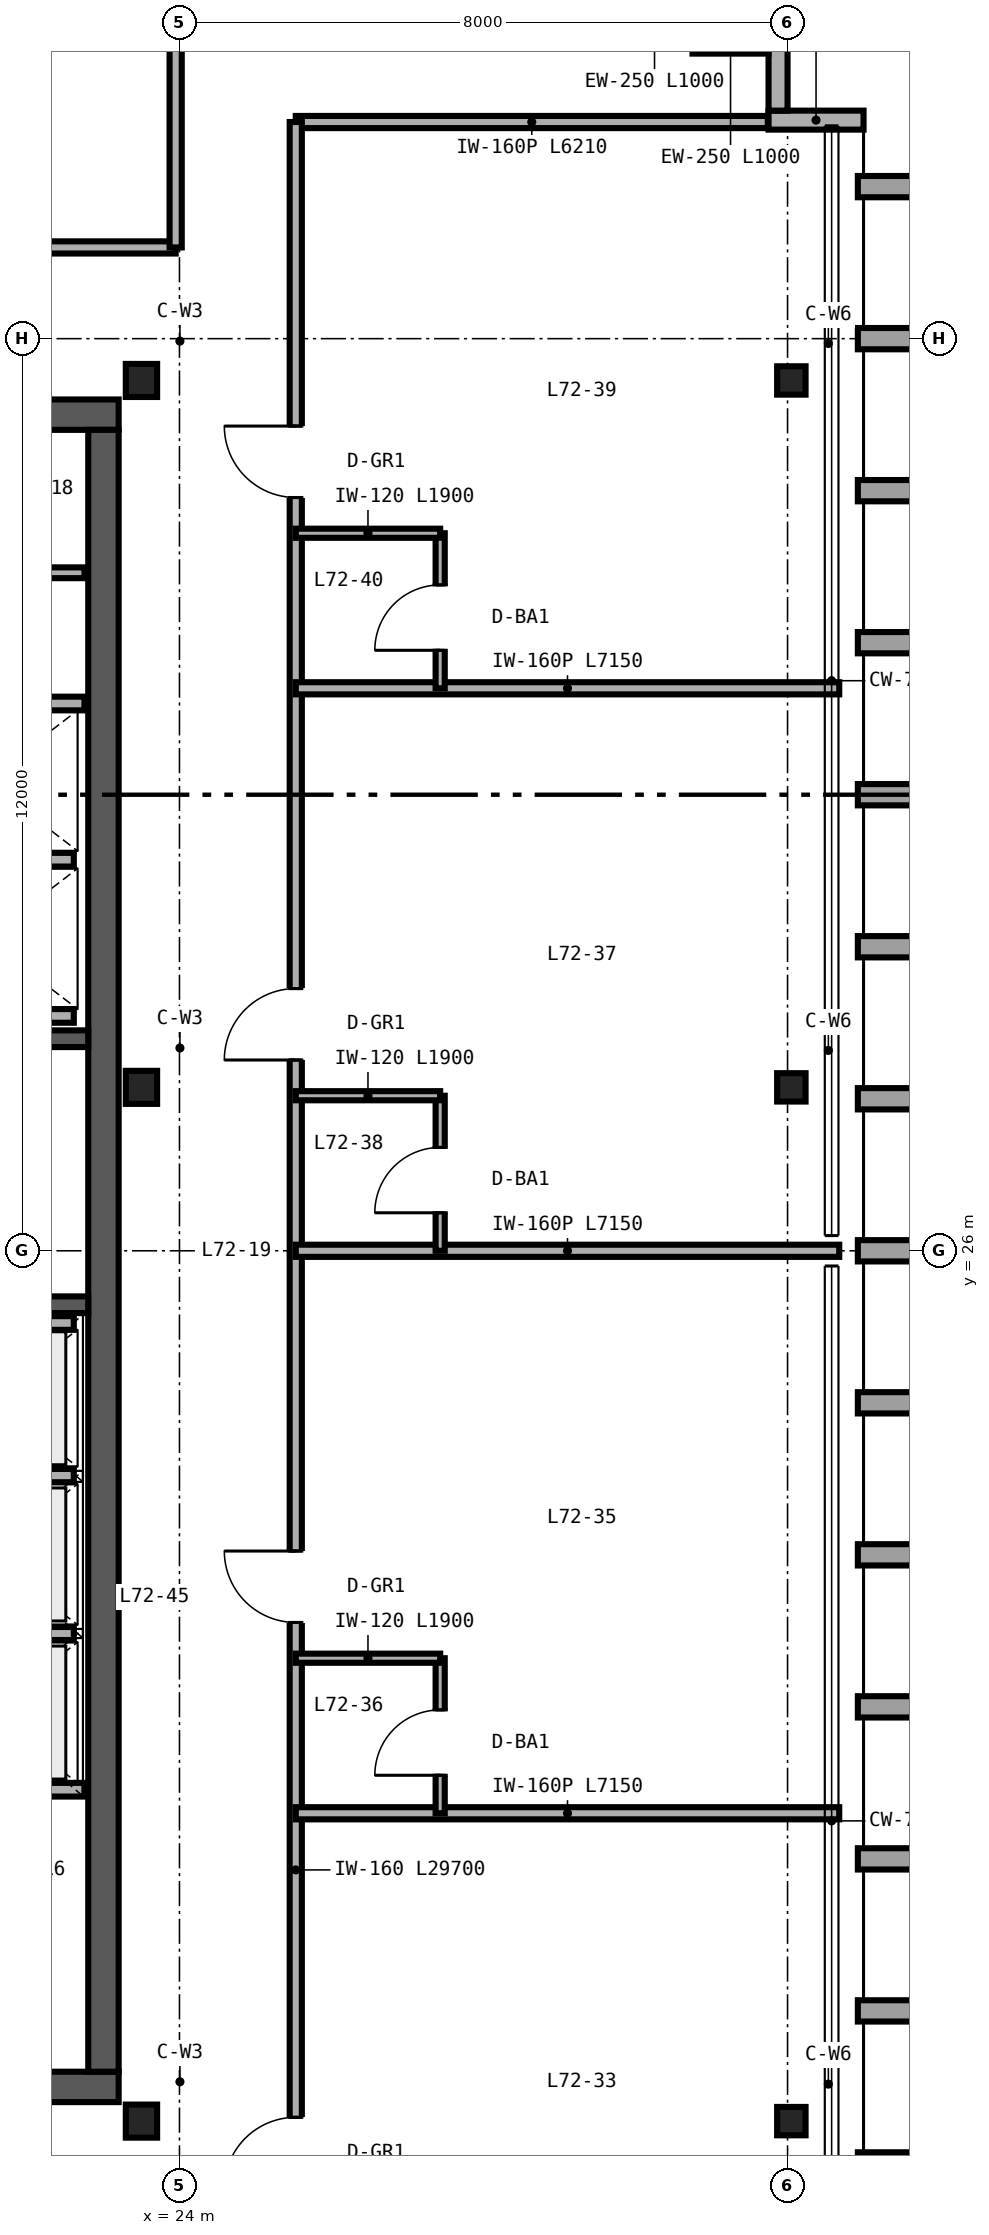
"""IFC4 building model, lengths in metres.
Left out: names, types, materials, properties, quantities, classifications, styles, units other than length and angle.
Written with IfcOpenShell. Run it as: python <this file> out.ifc"""

import sys

from ifc_helpers import new_model, si_unit, direction, frame, frame_2d, origin, origin_2d, place, context, subcontext, project, spatial, rectangle, i_section, extrude, source, transform, mapped, element, fill, save


model = new_model("IFC4")
c1 = context("Model", 3, precision=1e-05, world=origin(), true_north=direction((0.0, 1.0)))
c2 = subcontext(c1, "Body", "Model", "MODEL_VIEW")
j1 = project(units=[si_unit("LENGTHUNIT", "METRE"), si_unit("PLANEANGLEUNIT", "RADIAN")], contexts=[c1])
p1 = place(None, origin())
s1 = spatial("IfcSite", under=j1, at=p1, CompositionType="ELEMENT")
p2 = place(p1, origin())
s2 = spatial("IfcBuilding", under=s1, at=p2, CompositionType="ELEMENT")
p3 = place(p2, frame((0.0, 0.0, 283.2)))
s3 = spatial("IfcBuildingStorey", under=s2, at=p3, CompositionType="ELEMENT", Elevation=283.2)
p4 = place(p3, frame((10.8, 15.0, 0.0), z_axis=(0.0, 0.0, 1.0), x_axis=(1.0, 0.0, 0.0)))
e1 = element("IfcWall", 1, at=p4, inside=s3, PredefinedType="SHEAR", context=c2, shape_type="SweptSolid", body=[
    extrude(rectangle(XDim=12.4, YDim=0.4, at=frame_2d((6.2, 0.0))), origin(), (0.0, 0.0, 1.0), 3.38),
])
p5 = place(p4, frame((8.78, 0.0, 0.0)))
e2 = element("IfcOpeningElement", 2, at=p5, cuts=e1, PredefinedType="OPENING", context=c2, shape_type="SweptSolid", body=[
    extrude(rectangle(XDim=1.0, YDim=2.15, at=frame_2d((0.5, 1.075))), frame((0.0, 0.21, 0.0), z_axis=(0.0, -1.0, 0.0), x_axis=(1.0, 0.0, 0.0)), (0.0, 0.0, 1.0), 0.42),
])
p6 = place(p3, frame((10.8, 37.0, 0.0), z_axis=(0.0, 0.0, 1.0), x_axis=(1.0, 0.0, 0.0)))
e3 = element("IfcWall", 3, at=p6, inside=s3, PredefinedType="SHEAR", context=c2, shape_type="SweptSolid", body=[
    extrude(rectangle(XDim=12.4, YDim=0.4, at=frame_2d((6.2, 0.0))), origin(), (0.0, 0.0, 1.0), 3.38),
])
p7 = place(p6, frame((8.78, 0.0, 0.0)))
e4 = element("IfcOpeningElement", 4, at=p7, cuts=e3, PredefinedType="OPENING", context=c2, shape_type="SweptSolid", body=[
    extrude(rectangle(XDim=1.0, YDim=2.15, at=frame_2d((0.5, 1.075))), frame((0.0, 0.21, 0.0), z_axis=(0.0, -1.0, 0.0), x_axis=(1.0, 0.0, 0.0)), (0.0, 0.0, 1.0), 0.42),
])
p8 = place(p3, frame((23.0, 15.2, 0.0), z_axis=(0.0, 0.0, 1.0), x_axis=(0.0, 1.0, 0.0)))
e5 = element("IfcWall", 5, at=p8, inside=s3, PredefinedType="SHEAR", context=c2, shape_type="SweptSolid", body=[
    extrude(rectangle(XDim=21.6, YDim=0.4, at=frame_2d((10.8, 0.0))), origin(), (0.0, 0.0, 1.0), 3.38),
])
p9 = place(p3, frame((14.18, 25.29, 0.0), z_axis=(0.0, 0.0, 1.0), x_axis=(1.0, 0.0, 0.0)))
e6 = element("IfcWall", 6, at=p9, inside=s3, PredefinedType="SHEAR", context=c2, shape_type="SweptSolid", body=[
    extrude(rectangle(XDim=8.62, YDim=0.22, at=frame_2d((4.31, 0.0))), origin(), (0.0, 0.0, 1.0), 3.4),
])
p10 = place(p9, frame((0.47, 0.0, 0.0)))
e7 = element("IfcOpeningElement", 7, at=p10, cuts=e6, PredefinedType="OPENING", context=c2, shape_type="SweptSolid", body=[
    extrude(rectangle(XDim=1.05, YDim=2.15, at=frame_2d((0.525, 1.075))), frame((0.0, 0.12, 0.0), z_axis=(0.0, -1.0, 0.0), x_axis=(1.0, 0.0, 0.0)), (0.0, 0.0, 1.0), 0.24),
])
p11 = place(p3, frame((14.18, 28.79, 0.0), z_axis=(0.0, 0.0, 1.0), x_axis=(1.0, 0.0, 0.0)))
e8 = element("IfcWall", 8, at=p11, inside=s3, PredefinedType="SHEAR", context=c2, shape_type="SweptSolid", body=[
    extrude(rectangle(XDim=8.62, YDim=0.22, at=frame_2d((4.31, 0.0))), origin(), (0.0, 0.0, 1.0), 3.4),
])
m1 = source(origin(), c2, "Body", "SweptSolid", [
    extrude(i_section(OverallWidth=0.412, OverallDepth=0.435, WebThickness=0.036, FlangeThickness=0.057, FilletRadius=0.025, at=origin_2d()), origin(), (0.0, 0.0, 1.0), 3.38),
])
for number, where, z_axis, x_axis in (
    (9, (23.5, 14.55, 0.0), (0.0, 0.0, 1.0), (1.0, 0.0, 0.0)),
    (10, (23.5, 28.15, 0.0), (0.0, 0.0, 1.0), (1.0, 0.0, 0.0)),
    (11, (23.5, 37.45, 0.0), (0.0, 0.0, 1.0), (1.0, 0.0, 0.0)),
):
    element("IfcColumn", number, at=place(p3, frame(where, z_axis=z_axis, x_axis=x_axis)), inside=s3, PredefinedType="COLUMN", context=c2, shape_type="MappedRepresentation", body=[
        mapped(m1, transform((0.0, 0.0, 0.0), scale=1.0)),
    ])
m2 = source(origin(), c2, "Body", "SweptSolid", [
    extrude(i_section(OverallWidth=0.374, OverallDepth=0.373, WebThickness=0.016, FlangeThickness=0.026, FilletRadius=0.025, at=origin_2d()), origin(), (0.0, 0.0, 1.0), 3.38),
])
for number, where, z_axis, x_axis in (
    (12, (32.05, 14.55, 0.0), (0.0, 0.0, 1.0), (1.0, 0.0, 0.0)),
    (13, (32.05, 28.15, 0.0), (0.0, 0.0, 1.0), (1.0, 0.0, 0.0)),
    (14, (32.05, 37.45, 0.0), (0.0, 0.0, 1.0), (1.0, 0.0, 0.0)),
):
    element("IfcColumn", number, at=place(p3, frame(where, z_axis=z_axis, x_axis=x_axis)), inside=s3, PredefinedType="COLUMN", context=c2, shape_type="MappedRepresentation", body=[
        mapped(m2, transform((0.0, 0.0, 0.0), scale=1.0)),
    ])
p12 = place(p3, frame((33.0, 40.875, 0.0), z_axis=(0.0, 0.0, 1.0), x_axis=(-1.0, 0.0, 0.0)))
e15 = element("IfcWall", 15, at=p12, inside=s3, PredefinedType="SOLIDWALL", context=c2, shape_type="SweptSolid", body=[
    extrude(rectangle(XDim=1.25, YDim=0.25, at=frame_2d((0.625, 0.0))), origin(), (0.0, 0.0, 1.0), 3.38),
])
for number, where, z_axis, x_axis in (
    (16, (31.875, 41.0, 0.0), (0.0, 0.0, 1.0), (0.0, 1.0, 0.0)),
    (17, (31.75, 41.875, 0.0), (0.0, 0.0, 1.0), (-1.0, 0.0, 0.0)),
):
    element("IfcWall", number, at=place(p3, frame(where, z_axis=z_axis, x_axis=x_axis)), inside=s3, PredefinedType="SOLIDWALL", context=c2, shape_type="SweptSolid", body=[
        extrude(rectangle(XDim=1.0, YDim=0.25, at=frame_2d((0.5, 0.0))), origin(), (0.0, 0.0, 1.0), 3.38),
    ])
p13 = place(p3, frame((20.12, 18.91, 0.0), z_axis=(0.0, 0.0, 1.0), x_axis=(1.0, 0.0, 0.0)))
e18 = element("IfcWall", 18, at=p13, inside=s3, PredefinedType="SOLIDWALL", context=c2, shape_type="SweptSolid", body=[
    extrude(rectangle(XDim=2.63, YDim=0.18, at=frame_2d((1.315, 0.0))), origin(), (0.0, 0.0, 1.0), 3.38),
])
p14 = place(p3, frame((20.25, 25.05, 0.0), z_axis=(0.0, 0.0, 1.0), x_axis=(1.0, 0.0, 0.0)))
e19 = element("IfcWall", 19, at=p14, inside=s3, PredefinedType="SOLIDWALL", context=c2, shape_type="SweptSolid", body=[
    extrude(rectangle(XDim=2.36, YDim=0.18, at=frame_2d((1.18, 0.0))), origin(), (0.0, 0.0, 1.0), 3.38),
])
p15 = place(p3, frame((20.25, 20.965, 0.0), z_axis=(0.0, 0.0, 1.0), x_axis=(1.0, 0.0, 0.0)))
e20 = element("IfcWall", 20, at=p15, inside=s3, PredefinedType="SOLIDWALL", context=c2, shape_type="SweptSolid", body=[
    extrude(rectangle(XDim=2.36, YDim=0.18, at=frame_2d((1.18, 0.0))), origin(), (0.0, 0.0, 1.0), 2.48),
])
for number, where, z_axis, x_axis in (
    (21, (20.25, 23.045, 0.0), (0.0, 0.0, 1.0), (1.0, 0.0, 0.0)),
    (22, (20.25, 29.09, 0.0), (0.0, 0.0, 1.0), (1.0, 0.0, 0.0)),
):
    element("IfcWall", number, at=place(p3, frame(where, z_axis=z_axis, x_axis=x_axis)), inside=s3, PredefinedType="SOLIDWALL", context=c2, shape_type="SweptSolid", body=[
        extrude(rectangle(XDim=2.36, YDim=0.18, at=frame_2d((1.18, 0.0))), origin(), (0.0, 0.0, 1.0), 3.38),
    ])
p16 = place(p3, frame((20.25, 33.2, 0.0), z_axis=(0.0, 0.0, 1.0), x_axis=(1.0, 0.0, 0.0)))
e23 = element("IfcWall", 23, at=p16, inside=s3, PredefinedType="SOLIDWALL", context=c2, shape_type="SweptSolid", body=[
    extrude(rectangle(XDim=2.5, YDim=0.18, at=frame_2d((1.25, 0.0))), origin(), (0.0, 0.0, 1.0), 3.38),
])
p17 = place(p3, frame((20.25, 31.145, 0.0), z_axis=(0.0, 0.0, 1.0), x_axis=(1.0, 0.0, 0.0)))
e24 = element("IfcWall", 24, at=p17, inside=s3, PredefinedType="SOLIDWALL", context=c2, shape_type="SweptSolid", body=[
    extrude(rectangle(XDim=2.36, YDim=0.18, at=frame_2d((1.18, 0.0))), origin(), (0.0, 0.0, 1.0), 3.38),
])
p18 = place(p3, frame((20.74, 34.92, 0.0), z_axis=(0.0, 0.0, 1.0), x_axis=(1.0, 0.0, 0.0)))
e25 = element("IfcWall", 25, at=p18, inside=s3, PredefinedType="PARTITIONING", context=c2, shape_type="SweptSolid", body=[
    extrude(rectangle(XDim=2.01, YDim=0.142, at=frame_2d((1.005, 0.0))), origin(), (0.0, 0.0, 1.0), 3.38),
])
p19 = place(p18, frame((0.5, 0.0, 0.0)))
e26 = element("IfcOpeningElement", 26, at=p19, cuts=e25, PredefinedType="OPENING", context=c2, shape_type="SweptSolid", body=[
    extrude(rectangle(XDim=0.84, YDim=2.1, at=frame_2d((0.42, 1.05))), frame((0.0, 0.081, 0.0), z_axis=(0.0, -1.0, 0.0), x_axis=(1.0, 0.0, 0.0)), (0.0, 0.0, 1.0), 0.162),
])
p20 = place(p3, frame((11.2, 39.2, 0.0), z_axis=(0.0, 0.0, 1.0), x_axis=(1.0, 0.0, 0.0)))
e27 = element("IfcWall", 27, at=p20, inside=s3, PredefinedType="PARTITIONING", context=c2, shape_type="SweptSolid", body=[
    extrude(rectangle(XDim=12.75, YDim=0.16, at=frame_2d((6.375, 0.0))), origin(), (0.0, 0.0, 1.0), 3.38),
])
p21 = place(p20, frame((5.14, 0.0, 0.0)))
e28 = element("IfcOpeningElement", 28, at=p21, cuts=e27, PredefinedType="OPENING", context=c2, shape_type="SweptSolid", body=[
    extrude(rectangle(XDim=0.94, YDim=2.15, at=frame_2d((0.47, 1.075))), frame((0.0, 0.09, 0.0), z_axis=(0.0, -1.0, 0.0), x_axis=(1.0, 0.0, 0.0)), (0.0, 0.0, 1.0), 0.18),
])
p22 = place(p20, frame((9.095, 0.0, 0.0)))
e29 = element("IfcOpeningElement", 29, at=p22, cuts=e27, PredefinedType="OPENING", context=c2, shape_type="SweptSolid", body=[
    extrude(rectangle(XDim=0.96, YDim=2.15, at=frame_2d((0.48, 1.075))), frame((0.0, 0.09, 0.0), z_axis=(0.0, -1.0, 0.0), x_axis=(1.0, 0.0, 0.0)), (0.0, 0.0, 1.0), 0.18),
])
p23 = place(p3, frame((23.95, 39.2, 0.0), z_axis=(0.0, 0.0, 1.0), x_axis=(0.0, 1.0, 0.0)))
e30 = element("IfcWall", 30, at=p23, inside=s3, PredefinedType="PARTITIONING", context=c2, shape_type="SweptSolid", body=[
    extrude(rectangle(XDim=4.44, YDim=0.16, at=frame_2d((2.22, 0.0))), origin(), (0.0, 0.0, 1.0), 3.38),
])
p24 = place(p3, frame((25.53, 40.85, 0.0), z_axis=(0.0, 0.0, 1.0), x_axis=(1.0, 0.0, 0.0)))
e31 = element("IfcWall", 31, at=p24, inside=s3, PredefinedType="PARTITIONING", context=c2, shape_type="SweptSolid", body=[
    extrude(rectangle(XDim=6.21, YDim=0.16, at=frame_2d((3.105, 0.0))), origin(), (0.0, 0.0, 1.0), 3.38),
])
p25 = place(p3, frame((25.53, 11.15, 0.0), z_axis=(0.0, 0.0, 1.0), x_axis=(0.0, 1.0, 0.0)))
e32 = element("IfcWall", 32, at=p25, inside=s3, PredefinedType="PARTITIONING", context=c2, shape_type="SweptSolid", body=[
    extrude(rectangle(XDim=29.7, YDim=0.16, at=frame_2d((14.85, 0.0))), origin(), (0.0, 0.0, 1.0), 2.524),
])
p26 = place(p25, frame((2.51, 0.0, 0.0)))
e33 = element("IfcOpeningElement", 33, at=p26, cuts=e32, PredefinedType="OPENING", context=c2, shape_type="SweptSolid", body=[
    extrude(rectangle(XDim=0.94, YDim=2.15, at=frame_2d((0.47, 1.075))), frame((0.0, 0.09, 0.0), z_axis=(0.0, -1.0, 0.0), x_axis=(1.0, 0.0, 0.0)), (0.0, 0.0, 1.0), 0.18),
])
p27 = place(p25, frame((9.96, 0.0, 0.0)))
e34 = element("IfcOpeningElement", 34, at=p27, cuts=e32, PredefinedType="OPENING", context=c2, shape_type="SweptSolid", body=[
    extrude(rectangle(XDim=0.94, YDim=2.15, at=frame_2d((0.47, 1.075))), frame((0.0, 0.09, 0.0), z_axis=(0.0, -1.0, 0.0), x_axis=(1.0, 0.0, 0.0)), (0.0, 0.0, 1.0), 0.18),
])
p28 = place(p25, frame((17.36, 0.0, 0.0)))
e35 = element("IfcOpeningElement", 35, at=p28, cuts=e32, PredefinedType="OPENING", context=c2, shape_type="SweptSolid", body=[
    extrude(rectangle(XDim=0.94, YDim=2.15, at=frame_2d((0.47, 1.075))), frame((0.0, 0.09, 0.0), z_axis=(0.0, -1.0, 0.0), x_axis=(1.0, 0.0, 0.0)), (0.0, 0.0, 1.0), 0.18),
])
p29 = place(p25, frame((24.76, 0.0, 0.0)))
e36 = element("IfcOpeningElement", 36, at=p29, cuts=e32, PredefinedType="OPENING", context=c2, shape_type="SweptSolid", body=[
    extrude(rectangle(XDim=0.94, YDim=2.15, at=frame_2d((0.47, 1.075))), frame((0.0, 0.09, 0.0), z_axis=(0.0, -1.0, 0.0), x_axis=(1.0, 0.0, 0.0)), (0.0, 0.0, 1.0), 0.18),
])
for number, where, z_axis, x_axis in (
    (37, (25.53, 18.6, 0.0), (0.0, 0.0, 1.0), (1.0, 0.0, 0.0)),
    (38, (25.53, 26.0, 0.0), (0.0, 0.0, 1.0), (1.0, 0.0, 0.0)),
):
    element("IfcWall", number, at=place(p3, frame(where, z_axis=z_axis, x_axis=x_axis)), inside=s3, PredefinedType="PARTITIONING", context=c2, shape_type="SweptSolid", body=[
        extrude(rectangle(XDim=7.15, YDim=0.16, at=frame_2d((3.575, 0.0))), origin(), (0.0, 0.0, 1.0), 2.601),
    ])
p30 = place(p3, frame((27.43, 18.6, 0.0), z_axis=(0.0, 0.0, 1.0), x_axis=(0.0, 1.0, 0.0)))
e39 = element("IfcWall", 39, at=p30, inside=s3, PredefinedType="PARTITIONING", context=c2, shape_type="SweptSolid", body=[
    extrude(rectangle(XDim=2.04, YDim=0.12, at=frame_2d((1.02, 0.0))), origin(), (0.0, 0.0, 1.0), 3.38),
])
p31 = place(p30, frame((0.5, 0.0, 0.0)))
e40 = element("IfcOpeningElement", 40, at=p31, cuts=e39, PredefinedType="OPENING", context=c2, shape_type="SweptSolid", body=[
    extrude(rectangle(XDim=0.86, YDim=2.1, at=frame_2d((0.43, 1.05))), frame((0.0, 0.07, 0.0), z_axis=(0.0, -1.0, 0.0), x_axis=(1.0, 0.0, 0.0)), (0.0, 0.0, 1.0), 0.14),
])
p32 = place(p3, frame((25.53, 20.64, 0.0), z_axis=(0.0, 0.0, 1.0), x_axis=(1.0, 0.0, 0.0)))
e41 = element("IfcWall", 41, at=p32, inside=s3, PredefinedType="PARTITIONING", context=c2, shape_type="SweptSolid", body=[
    extrude(rectangle(XDim=1.9, YDim=0.12, at=frame_2d((0.95, 0.0))), origin(), (0.0, 0.0, 1.0), 3.38),
])
p33 = place(p3, frame((25.53, 33.4, 0.0), z_axis=(0.0, 0.0, 1.0), x_axis=(1.0, 0.0, 0.0)))
e42 = element("IfcWall", 42, at=p33, inside=s3, PredefinedType="PARTITIONING", context=c2, shape_type="SweptSolid", body=[
    extrude(rectangle(XDim=7.15, YDim=0.16, at=frame_2d((3.575, 0.0))), origin(), (0.0, 0.0, 1.0), 2.763),
])
p34 = place(p3, frame((27.43, 26.0, 0.0), z_axis=(0.0, 0.0, 1.0), x_axis=(0.0, 1.0, 0.0)))
e43 = element("IfcWall", 43, at=p34, inside=s3, PredefinedType="PARTITIONING", context=c2, shape_type="SweptSolid", body=[
    extrude(rectangle(XDim=2.04, YDim=0.12, at=frame_2d((1.02, 0.0))), origin(), (0.0, 0.0, 1.0), 2.524),
])
p35 = place(p34, frame((0.5, 0.0, 0.0)))
e44 = element("IfcOpeningElement", 44, at=p35, cuts=e43, PredefinedType="OPENING", context=c2, shape_type="SweptSolid", body=[
    extrude(rectangle(XDim=0.86, YDim=2.1, at=frame_2d((0.43, 1.05))), frame((0.0, 0.07, 0.0), z_axis=(0.0, -1.0, 0.0), x_axis=(1.0, 0.0, 0.0)), (0.0, 0.0, 1.0), 0.14),
])
p36 = place(p3, frame((25.53, 28.04, 0.0), z_axis=(0.0, 0.0, 1.0), x_axis=(1.0, 0.0, 0.0)))
e45 = element("IfcWall", 45, at=p36, inside=s3, PredefinedType="PARTITIONING", context=c2, shape_type="SweptSolid", body=[
    extrude(rectangle(XDim=1.9, YDim=0.12, at=frame_2d((0.95, 0.0))), origin(), (0.0, 0.0, 1.0), 2.524),
])
p37 = place(p3, frame((27.43, 33.4, 0.0), z_axis=(0.0, 0.0, 1.0), x_axis=(0.0, 1.0, 0.0)))
e46 = element("IfcWall", 46, at=p37, inside=s3, PredefinedType="PARTITIONING", context=c2, shape_type="SweptSolid", body=[
    extrude(rectangle(XDim=2.04, YDim=0.12, at=frame_2d((1.02, 0.0))), origin(), (0.0, 0.0, 1.0), 3.38),
])
p38 = place(p37, frame((0.5, 0.0, 0.0)))
e47 = element("IfcOpeningElement", 47, at=p38, cuts=e46, PredefinedType="OPENING", context=c2, shape_type="SweptSolid", body=[
    extrude(rectangle(XDim=0.86, YDim=2.1, at=frame_2d((0.43, 1.05))), frame((0.0, 0.07, 0.0), z_axis=(0.0, -1.0, 0.0), x_axis=(1.0, 0.0, 0.0)), (0.0, 0.0, 1.0), 0.14),
])
p39 = place(p3, frame((25.53, 35.44, 0.0), z_axis=(0.0, 0.0, 1.0), x_axis=(1.0, 0.0, 0.0)))
e48 = element("IfcWall", 48, at=p39, inside=s3, PredefinedType="PARTITIONING", context=c2, shape_type="SweptSolid", body=[
    extrude(rectangle(XDim=1.9, YDim=0.12, at=frame_2d((0.95, 0.0))), origin(), (0.0, 0.0, 1.0), 3.38),
])
m3 = source(origin(), c2, "Body", "SweptSolid", [
    extrude(rectangle(XDim=0.94, YDim=2.15, at=frame_2d((0.47, 1.075))), frame((0.0, 0.025, 0.0), z_axis=(0.0, -1.0, 0.0), x_axis=(1.0, 0.0, 0.0)), (0.0, 0.0, 1.0), 0.05),
])
p40 = place(p26, origin())
e49 = element("IfcDoor", 49, at=p40, inside=s3, OperationType="SINGLE_SWING_LEFT", PredefinedType="DOOR", context=c2, shape_type="MappedRepresentation", body=[
    mapped(m3, transform((0.0, 0.0, 0.0), scale=1.0)),
])
fill(e33, e49)
m4 = source(origin(), c2, "Body", "SweptSolid", [
    extrude(rectangle(XDim=0.86, YDim=2.1, at=frame_2d((0.43, 1.05))), frame((0.0, 0.025, 0.0), z_axis=(0.0, -1.0, 0.0), x_axis=(1.0, 0.0, 0.0)), (0.0, 0.0, 1.0), 0.05),
])
p41 = place(p31, origin())
e50 = element("IfcDoor", 50, at=p41, inside=s3, OperationType="SINGLE_SWING_LEFT", PredefinedType="DOOR", context=c2, shape_type="MappedRepresentation", body=[
    mapped(m4, transform((0.0, 0.0, 0.0), scale=1.0)),
])
fill(e40, e50)
p42 = place(p27, origin())
e51 = element("IfcDoor", 51, at=p42, inside=s3, OperationType="SINGLE_SWING_RIGHT", PredefinedType="DOOR", context=c2, shape_type="MappedRepresentation", body=[
    mapped(m3, transform((0.0, 0.0, 0.0), scale=1.0)),
])
fill(e34, e51)
p43 = place(p35, origin())
e52 = element("IfcDoor", 52, at=p43, inside=s3, OperationType="SINGLE_SWING_LEFT", PredefinedType="DOOR", context=c2, shape_type="MappedRepresentation", body=[
    mapped(m4, transform((0.0, 0.0, 0.0), scale=1.0)),
])
fill(e44, e52)
p44 = place(p28, origin())
e53 = element("IfcDoor", 53, at=p44, inside=s3, OperationType="SINGLE_SWING_LEFT", PredefinedType="DOOR", context=c2, shape_type="MappedRepresentation", body=[
    mapped(m3, transform((0.0, 0.0, 0.0), scale=1.0)),
])
fill(e35, e53)
p45 = place(p38, origin())
e54 = element("IfcDoor", 54, at=p45, inside=s3, OperationType="SINGLE_SWING_LEFT", PredefinedType="DOOR", context=c2, shape_type="MappedRepresentation", body=[
    mapped(m4, transform((0.0, 0.0, 0.0), scale=1.0)),
])
fill(e47, e54)
p46 = place(p29, origin())
e55 = element("IfcDoor", 55, at=p46, inside=s3, OperationType="SINGLE_SWING_RIGHT", PredefinedType="DOOR", context=c2, shape_type="MappedRepresentation", body=[
    mapped(m3, transform((0.0, 0.0, 0.0), scale=1.0)),
])
fill(e36, e55)
save(model, sys.argv[1])
